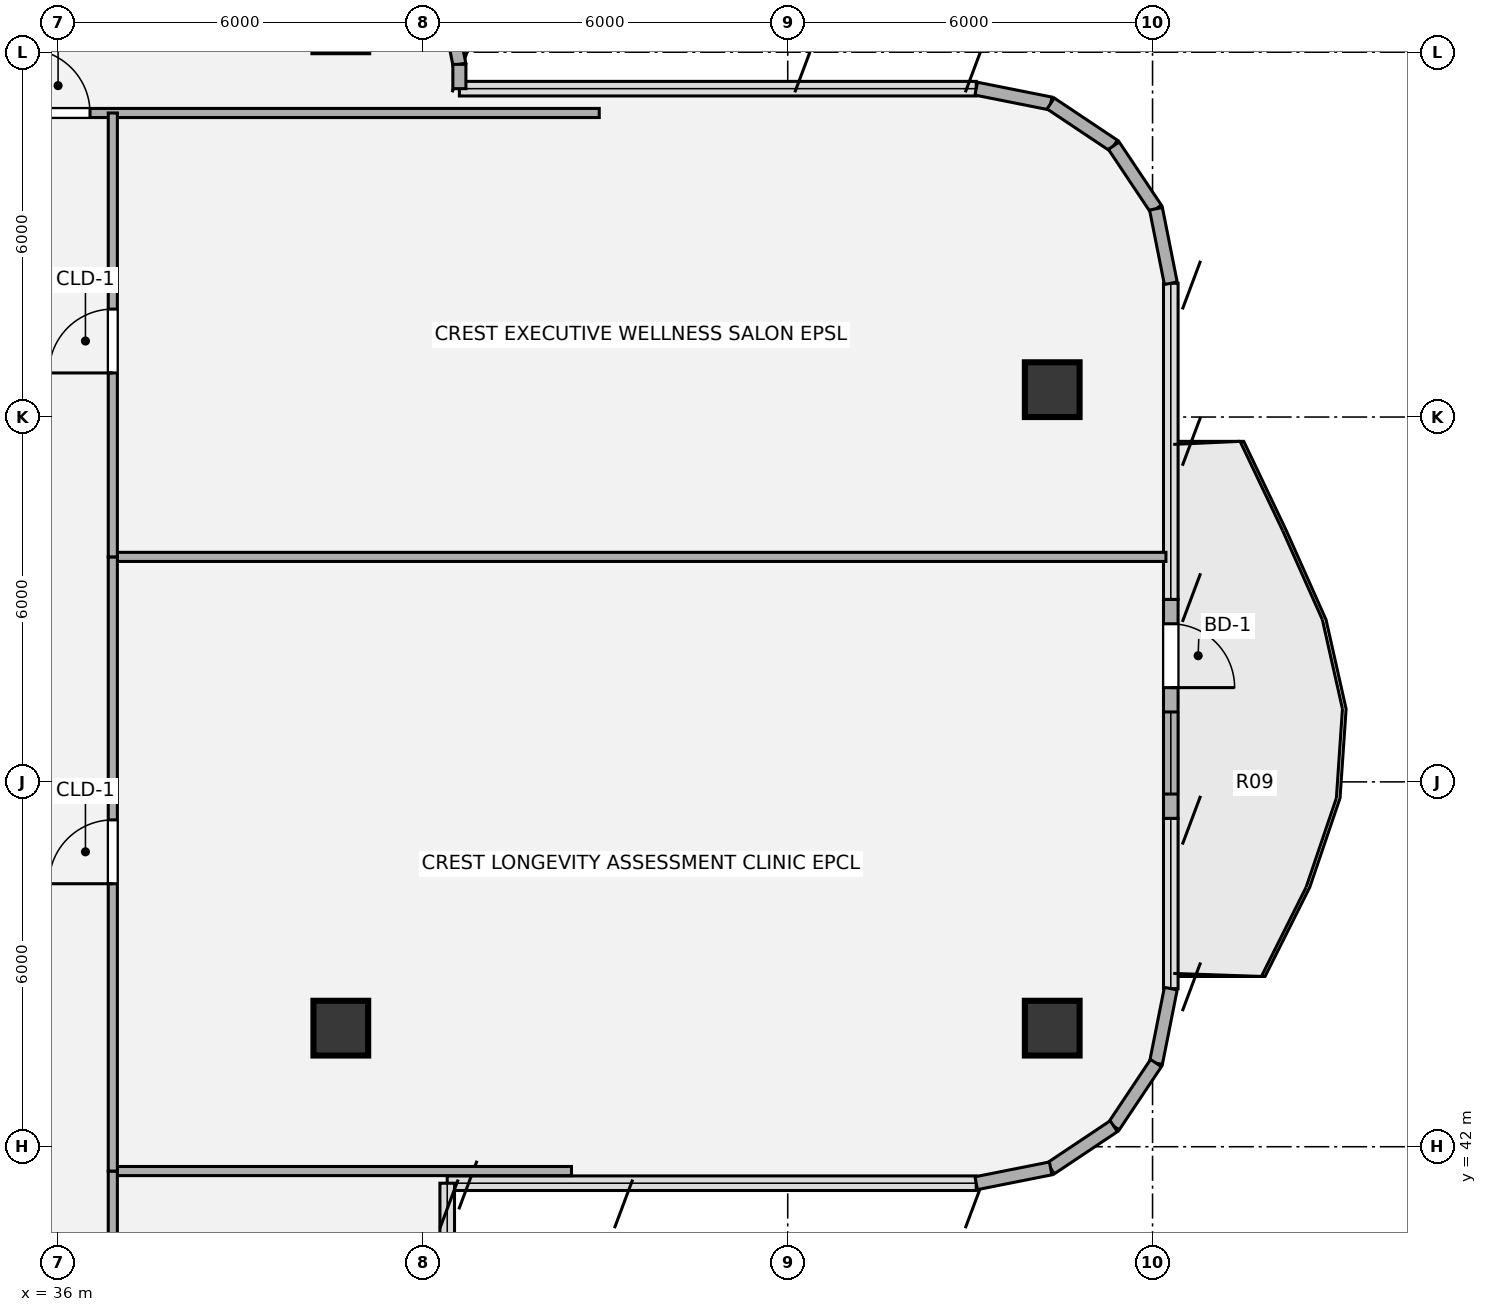
"""IFC4 building model, lengths in metres.
Left out: names, types, materials, properties, quantities, classifications, styles, units other than length and angle.
Written with IfcOpenShell. Run it as: python <this file> out.ifc"""

import sys

from ifc_helpers import new_model, si_unit, direction, frame, frame_2d, origin, origin_2d, place, context, subcontext, project, spatial, rectangle, hollow_circle, extrude, source, transform, mapped, element, fill, save


model = new_model("IFC4")
c1 = context("Model", 3, precision=1e-05, world=origin(), true_north=direction((0.0, 1.0)))
c2 = subcontext(c1, "Body", "Model", "MODEL_VIEW")
j1 = project(units=[si_unit("LENGTHUNIT", "METRE"), si_unit("PLANEANGLEUNIT", "RADIAN")], contexts=[c1])
p1 = place(None, origin())
s1 = spatial("IfcSite", under=j1, at=p1, CompositionType="ELEMENT")
p2 = place(p1, origin())
s2 = spatial("IfcBuilding", under=s1, at=p2, CompositionType="ELEMENT")
p3 = place(p2, frame((0.0, 0.0, 279.72)))
s3 = spatial("IfcBuildingStorey", under=s2, at=p3, CompositionType="ELEMENT", Elevation=279.72)
m1 = source(origin(), c2, "Body", "SweptSolid", [
    extrude(hollow_circle(Radius=0.45, WallThickness=0.032, at=origin_2d()), origin(), (0.0, 0.0, 1.0), 3.78),
])
for number, where, z_axis, x_axis in (
    (1, (52.35, 43.95, 0.0), (0.0, 0.0, 1.0), (1.0, 0.0, 0.0)),
    (2, (52.35, 54.45, 0.0), (0.0, 0.0, 1.0), (1.0, 0.0, 0.0)),
    (3, (40.65, 43.95, 0.0), (0.0, 0.0, 1.0), (1.0, 0.0, 0.0)),
):
    element("IfcColumn", number, at=place(p3, frame(where, z_axis=z_axis, x_axis=x_axis)), inside=s3, PredefinedType="COLUMN", context=c2, shape_type="MappedRepresentation", body=[
        mapped(m1, transform((0.0, 0.0, 0.0), x_axis=(1.0, 0.0, 0.0), y_axis=(0.0, 1.0, 0.0), z_axis=(0.0, 0.0, 1.0), scale=1.0)),
    ])
p4 = place(p3, frame((42.402, 60.795, 0.0), z_axis=(0.0, 0.0, 1.0), x_axis=(0.195190360752, -0.980765376158, 0.0)))
e4 = element("IfcWall", 4, at=p4, inside=s3, PredefinedType="SOLIDWALL", context=c2, shape_type="SweptSolid", body=[
    extrude(rectangle(XDim=1.014, YDim=0.215, at=frame_2d((0.507, 0.0))), origin(), (0.0, 0.0, 1.0), 3.53),
])
p5 = place(p3, frame((42.6, 59.8, 0.0), z_axis=(0.0, 0.0, 1.0), x_axis=(0.0, -1.0, 0.0)))
e5 = element("IfcWall", 5, at=p5, inside=s3, PredefinedType="SOLIDWALL", context=c2, shape_type="SweptSolid", body=[
    extrude(rectangle(XDim=0.4, YDim=0.215, at=frame_2d((0.2, 0.0))), origin(), (0.0, 0.0, 1.0), 3.53),
])
for number, where, z_axis, x_axis in (
    (6, (51.1, 59.4, 0.0), (0.0, 0.0, 1.0), (0.981, -0.195, 0.0)),
    (7, (52.325, 59.156, 0.0), (0.0, 0.0, 1.0), (0.831, -0.556, 0.0)),
    (8, (53.363, 58.463, 0.0), (0.0, 0.0, 1.0), (0.556, -0.831, 0.0)),
    (9, (54.056, 57.425, 0.0), (0.0, 0.0, 1.0), (0.195, -0.981, 0.0)),
):
    element("IfcWall", number, at=place(p3, frame(where, z_axis=z_axis, x_axis=x_axis)), inside=s3, PredefinedType="SOLIDWALL", context=c2, shape_type="SweptSolid", body=[
        extrude(rectangle(XDim=1.249, YDim=0.215, at=frame_2d((0.624, 0.0))), origin(), (0.0, 0.0, 1.0), 3.53),
    ])
p6 = place(p3, frame((54.3, 51.0, 0.0), z_axis=(0.0, 0.0, 1.0), x_axis=(0.0, -1.0, 0.0)))
e10 = element("IfcWall", 10, at=p6, inside=s3, PredefinedType="SOLIDWALL", context=c2, shape_type="SweptSolid", body=[
    extrude(rectangle(XDim=3.6, YDim=0.24, at=frame_2d((1.8, 0.0))), origin(), (0.0, 0.0, 1.0), 3.53),
])
p7 = place(p6, frame((0.4, 0.0, 0.0)))
e11 = element("IfcOpeningElement", 11, at=p7, cuts=e10, PredefinedType="OPENING", context=c2, shape_type="SweptSolid", body=[
    extrude(rectangle(XDim=1.05, YDim=2.15, at=origin_2d()), frame((0.525, 0.13, 1.075), z_axis=(0.0, -1.0, 0.0), x_axis=(1.0, 0.0, 0.0)), (0.0, 0.0, 1.0), 0.26),
])
p8 = place(p6, frame((1.85, 0.0, 0.85)))
e12 = element("IfcOpeningElement", 12, at=p8, cuts=e10, PredefinedType="OPENING", context=c2, shape_type="SweptSolid", body=[
    extrude(rectangle(XDim=1.35, YDim=1.35, at=origin_2d()), frame((0.675, 0.13, 0.675), z_axis=(0.0, -1.0, 0.0), x_axis=(1.0, 0.0, 0.0)), (0.0, 0.0, 1.0), 0.26),
])
for number, where, z_axis, x_axis in (
    (13, (54.3, 44.6, 0.0), (0.0, 0.0, 1.0), (-0.195, -0.981, 0.0)),
    (14, (54.056, 43.375, 0.0), (0.0, 0.0, 1.0), (-0.556, -0.831, 0.0)),
    (15, (53.363, 42.337, 0.0), (0.0, 0.0, 1.0), (-0.831, -0.556, 0.0)),
    (16, (52.325, 41.644, 0.0), (0.0, 0.0, 1.0), (-0.981, -0.195, 0.0)),
):
    element("IfcWall", number, at=place(p3, frame(where, z_axis=z_axis, x_axis=x_axis)), inside=s3, PredefinedType="SOLIDWALL", context=c2, shape_type="SweptSolid", body=[
        extrude(rectangle(XDim=1.249, YDim=0.215, at=frame_2d((0.624, 0.0))), origin(), (0.0, 0.0, 1.0), 3.53),
    ])
p9 = place(p3, frame((36.9, 41.6, 0.0), z_axis=(0.0, 0.0, 1.0), x_axis=(1.0, 0.0, 0.0)))
e17 = element("IfcWall", 17, at=p9, inside=s3, PredefinedType="PARTITIONING", context=c2, shape_type="SweptSolid", body=[
    extrude(rectangle(XDim=7.543, YDim=0.15, at=frame_2d((3.772, 0.0))), origin(), (0.0, 0.0, 1.0), 3.5),
])
p10 = place(p3, frame((36.9, 51.7, 0.0), z_axis=(0.0, 0.0, 1.0), x_axis=(1.0, 0.0, 0.0)))
e18 = element("IfcWall", 18, at=p10, inside=s3, PredefinedType="PARTITIONING", context=c2, shape_type="SweptSolid", body=[
    extrude(rectangle(XDim=17.32, YDim=0.15, at=frame_2d((8.66, 0.0))), origin(), (0.0, 0.0, 1.0), 3.055),
])
p11 = place(p3, frame((27.1, 59.0, 0.0), z_axis=(0.0, 0.0, 1.0), x_axis=(1.0, 0.0, 0.0)))
e19 = element("IfcWall", 19, at=p11, inside=s3, PredefinedType="PARTITIONING", context=c2, shape_type="SweptSolid", body=[
    extrude(rectangle(XDim=17.8, YDim=0.15, at=frame_2d((8.9, 0.0))), origin(), (0.0, 0.0, 1.0), 3.308),
])
p12 = place(p11, frame((8.375, 0.0, 0.0)))
e20 = element("IfcOpeningElement", 20, at=p12, cuts=e19, PredefinedType="OPENING", context=c2, shape_type="SweptSolid", body=[
    extrude(rectangle(XDim=1.05, YDim=2.1, at=origin_2d()), frame((0.525, 0.085, 1.05), z_axis=(0.0, -1.0, 0.0), x_axis=(1.0, 0.0, 0.0)), (0.0, 0.0, 1.0), 0.17),
])
p13 = place(p3, frame((36.9, 20.4, 0.0), z_axis=(0.0, 0.0, 1.0), x_axis=(0.0, 1.0, 0.0)))
e21 = element("IfcWall", 21, at=p13, inside=s3, PredefinedType="PARTITIONING", context=c2, shape_type="SweptSolid", body=[
    extrude(rectangle(XDim=21.2, YDim=0.15, at=frame_2d((10.6, 0.0))), origin(), (0.0, 0.0, 1.0), 3.5),
])
p14 = place(p13, frame((6.575, 0.0, 0.0)))
e22 = element("IfcOpeningElement", 22, at=p14, cuts=e21, PredefinedType="OPENING", context=c2, shape_type="SweptSolid", body=[
    extrude(rectangle(XDim=1.05, YDim=2.1, at=origin_2d()), frame((0.525, 0.085, 1.05), z_axis=(0.0, -1.0, 0.0), x_axis=(1.0, 0.0, 0.0)), (0.0, 0.0, 1.0), 0.17),
])
p15 = place(p3, frame((36.9, 41.6, 0.0), z_axis=(0.0, 0.0, 1.0), x_axis=(0.0, 1.0, 0.0)))
e23 = element("IfcWall", 23, at=p15, inside=s3, PredefinedType="PARTITIONING", context=c2, shape_type="SweptSolid", body=[
    extrude(rectangle(XDim=10.1, YDim=0.15, at=frame_2d((5.05, 0.0))), origin(), (0.0, 0.0, 1.0), 3.5),
])
p16 = place(p15, frame((4.725, 0.0, 0.0)))
e24 = element("IfcOpeningElement", 24, at=p16, cuts=e23, PredefinedType="OPENING", context=c2, shape_type="SweptSolid", body=[
    extrude(rectangle(XDim=1.05, YDim=2.1, at=origin_2d()), frame((0.525, 0.085, 1.05), z_axis=(0.0, -1.0, 0.0), x_axis=(1.0, 0.0, 0.0)), (0.0, 0.0, 1.0), 0.17),
])
p17 = place(p3, frame((36.9, 51.7, 0.0), z_axis=(0.0, 0.0, 1.0), x_axis=(0.0, 1.0, 0.0)))
e25 = element("IfcWall", 25, at=p17, inside=s3, PredefinedType="PARTITIONING", context=c2, shape_type="SweptSolid", body=[
    extrude(rectangle(XDim=7.3, YDim=0.15, at=frame_2d((3.65, 0.0))), origin(), (0.0, 0.0, 1.0), 3.5),
])
p18 = place(p17, frame((3.025, 0.0, 0.0)))
e26 = element("IfcOpeningElement", 26, at=p18, cuts=e25, PredefinedType="OPENING", context=c2, shape_type="SweptSolid", body=[
    extrude(rectangle(XDim=1.05, YDim=2.1, at=origin_2d()), frame((0.525, 0.085, 1.05), z_axis=(0.0, -1.0, 0.0), x_axis=(1.0, 0.0, 0.0)), (0.0, 0.0, 1.0), 0.17),
])
m2 = source(origin(), c2, "Body", "SweptSolid", [
    extrude(rectangle(XDim=1.05, YDim=2.15, at=origin_2d()), frame((0.525, 0.025, 1.075), z_axis=(0.0, -1.0, 0.0), x_axis=(1.0, 0.0, 0.0)), (0.0, 0.0, 1.0), 0.05),
])
p19 = place(p7, origin())
e27 = element("IfcDoor", 27, at=p19, inside=s3, OperationType="SINGLE_SWING_RIGHT", PredefinedType="DOOR", context=c2, shape_type="MappedRepresentation", body=[
    mapped(m2, transform((0.0, 0.0, 0.0), x_axis=(1.0, 0.0, 0.0), y_axis=(0.0, 1.0, 0.0), z_axis=(0.0, 0.0, 1.0), scale=1.0)),
])
fill(e11, e27)
m3 = source(origin(), c2, "Body", "SweptSolid", [
    extrude(rectangle(XDim=1.35, YDim=1.35, at=origin_2d()), frame((0.675, 0.03, 0.675), z_axis=(0.0, -1.0, 0.0), x_axis=(1.0, 0.0, 0.0)), (0.0, 0.0, 1.0), 0.06),
])
p20 = place(p8, origin())
e28 = element("IfcWindow", 28, at=p20, inside=s3, PartitioningType="SINGLE_PANEL", PredefinedType="WINDOW", context=c2, shape_type="MappedRepresentation", body=[
    mapped(m3, transform((0.0, 0.0, 0.0), x_axis=(1.0, 0.0, 0.0), y_axis=(0.0, 1.0, 0.0), z_axis=(0.0, 0.0, 1.0), scale=1.0)),
])
fill(e12, e28)
m4 = source(origin(), c2, "Body", "SweptSolid", [
    extrude(rectangle(XDim=1.05, YDim=2.1, at=origin_2d()), frame((0.525, 0.025, 1.05), z_axis=(0.0, -1.0, 0.0), x_axis=(1.0, 0.0, 0.0)), (0.0, 0.0, 1.0), 0.05),
])
p21 = place(p12, origin())
e29 = element("IfcDoor", 29, at=p21, inside=s3, OperationType="SINGLE_SWING_LEFT", PredefinedType="DOOR", context=c2, shape_type="MappedRepresentation", body=[
    mapped(m4, transform((0.0, 0.0, 0.0), x_axis=(1.0, 0.0, 0.0), y_axis=(0.0, 1.0, 0.0), z_axis=(0.0, 0.0, 1.0), scale=1.0)),
])
fill(e20, e29)
p22 = place(p16, origin())
e30 = element("IfcDoor", 30, at=p22, inside=s3, OperationType="SINGLE_SWING_LEFT", PredefinedType="DOOR", context=c2, shape_type="MappedRepresentation", body=[
    mapped(m4, transform((0.0, 0.0, 0.0), x_axis=(1.0, 0.0, 0.0), y_axis=(0.0, 1.0, 0.0), z_axis=(0.0, 0.0, 1.0), scale=1.0)),
])
fill(e24, e30)
p23 = place(p18, origin())
e31 = element("IfcDoor", 31, at=p23, inside=s3, OperationType="SINGLE_SWING_LEFT", PredefinedType="DOOR", context=c2, shape_type="MappedRepresentation", body=[
    mapped(m4, transform((0.0, 0.0, 0.0), x_axis=(1.0, 0.0, 0.0), y_axis=(0.0, 1.0, 0.0), z_axis=(0.0, 0.0, 1.0), scale=1.0)),
])
fill(e26, e31)
save(model, sys.argv[1])
